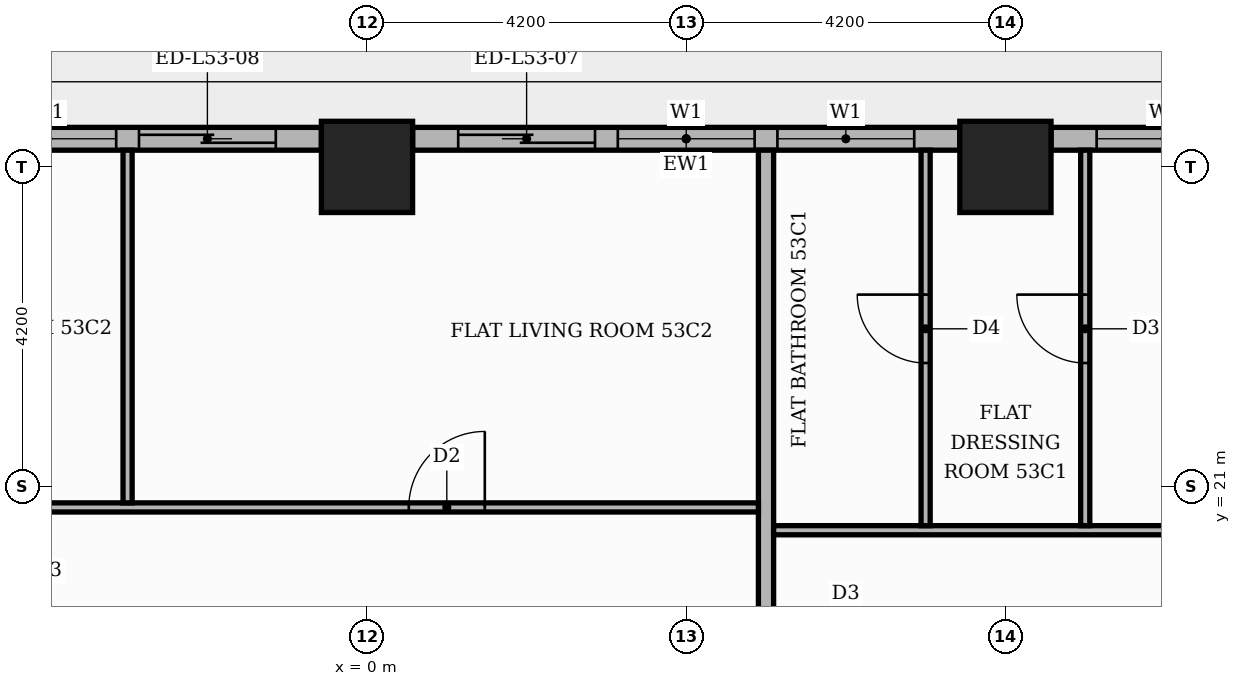
"""IFC4 building model, lengths in metres.
Left out: names, types, materials, properties, quantities, classifications, styles, units other than length and angle.
Written with IfcOpenShell. Run it as: python <this file> out.ifc"""

import sys

from ifc_helpers import new_model, si_unit, direction, frame, frame_2d, origin, origin_2d, place, context, subcontext, project, spatial, rectangle, extrude, element, fill, save


model = new_model("IFC4")
c1 = context("Model", 3, precision=1e-05, world=origin(), true_north=direction((0.0, 1.0)))
c2 = subcontext(c1, "Body", "Model", "MODEL_VIEW")
j1 = project(units=[si_unit("LENGTHUNIT", "METRE"), si_unit("PLANEANGLEUNIT", "RADIAN")], contexts=[c1])
p1 = place(None, origin())
s1 = spatial("IfcSite", under=j1, at=p1, CompositionType="ELEMENT")
p2 = place(p1, origin())
s2 = spatial("IfcBuilding", under=s1, at=p2, CompositionType="ELEMENT")
p3 = place(p2, frame((0.0, 0.0, 223.5)))
s3 = spatial("IfcBuildingStorey", under=s2, at=p3, CompositionType="ELEMENT", Elevation=223.5)
for number, where, z_axis, x_axis in (
    (1, (0.0, 25.2, 0.0), (0.0, 0.0, 1.0), (1.0, 0.0, 0.0)),
    (2, (8.4, 25.2, 0.0), (0.0, 0.0, 1.0), (1.0, 0.0, 0.0)),
):
    element("IfcColumn", number, at=place(p3, frame(where, z_axis=z_axis, x_axis=x_axis)), inside=s3, PredefinedType="COLUMN", context=c2, shape_type="SweptSolid", body=[
        extrude(rectangle(XDim=1.2, YDim=1.2, at=origin_2d()), origin(), (0.0, 0.0, 1.0), 3.9),
    ])
p4 = place(p3, frame((16.2, 25.57, 0.0), z_axis=(0.0, 0.0, 1.0), x_axis=(-1.0, 0.0, 0.0)))
e3 = element("IfcWall", 3, at=p4, inside=s3, PredefinedType="STANDARD", context=c2, shape_type="SweptSolid", body=[
    extrude(rectangle(XDim=7.2, YDim=0.3, at=frame_2d((3.6, 0.0))), origin(), (0.0, 0.0, 1.0), 3.48),
])
p5 = place(p4, frame((0.6, 0.0, 0.0)))
e4 = element("IfcOpeningElement", 4, at=p5, cuts=e3, PredefinedType="OPENING", context=c2, shape_type="SweptSolid", body=[
    extrude(rectangle(XDim=1.8, YDim=2.4, at=frame_2d((0.9, 1.2))), frame((0.0, 0.16, 0.0), z_axis=(0.0, -1.0, 0.0), x_axis=(1.0, 0.0, 0.0)), (0.0, 0.0, 1.0), 0.32),
])
p6 = place(p4, frame((2.7, 0.0, 0.0)))
e5 = element("IfcOpeningElement", 5, at=p6, cuts=e3, PredefinedType="OPENING", context=c2, shape_type="SweptSolid", body=[
    extrude(rectangle(XDim=1.8, YDim=2.4, at=frame_2d((0.9, 1.2))), frame((0.0, 0.16, 0.0), z_axis=(0.0, -1.0, 0.0), x_axis=(1.0, 0.0, 0.0)), (0.0, 0.0, 1.0), 0.32),
])
p7 = place(p4, frame((4.8, 0.0, 0.9)))
e6 = element("IfcOpeningElement", 6, at=p7, cuts=e3, PredefinedType="OPENING", context=c2, shape_type="SweptSolid", body=[
    extrude(rectangle(XDim=1.8, YDim=2.1, at=frame_2d((0.9, 1.05))), frame((0.0, 0.16, 0.0), z_axis=(0.0, -1.0, 0.0), x_axis=(1.0, 0.0, 0.0)), (0.0, 0.0, 1.0), 0.32),
])
p8 = place(p3, frame((7.8, 25.57, 0.0), z_axis=(0.0, 0.0, 1.0), x_axis=(-1.0, 0.0, 0.0)))
e7 = element("IfcWall", 7, at=p8, inside=s3, PredefinedType="STANDARD", context=c2, shape_type="SweptSolid", body=[
    extrude(rectangle(XDim=7.2, YDim=0.3, at=frame_2d((3.6, 0.0))), origin(), (0.0, 0.0, 1.0), 3.48),
])
p9 = place(p8, frame((0.6, 0.0, 0.9)))
e8 = element("IfcOpeningElement", 8, at=p9, cuts=e7, PredefinedType="OPENING", context=c2, shape_type="SweptSolid", body=[
    extrude(rectangle(XDim=1.8, YDim=2.1, at=frame_2d((0.9, 1.05))), frame((0.0, 0.16, 0.0), z_axis=(0.0, -1.0, 0.0), x_axis=(1.0, 0.0, 0.0)), (0.0, 0.0, 1.0), 0.32),
])
p10 = place(p8, frame((2.7, 0.0, 0.9)))
e9 = element("IfcOpeningElement", 9, at=p10, cuts=e7, PredefinedType="OPENING", context=c2, shape_type="SweptSolid", body=[
    extrude(rectangle(XDim=1.8, YDim=2.1, at=frame_2d((0.9, 1.05))), frame((0.0, 0.16, 0.0), z_axis=(0.0, -1.0, 0.0), x_axis=(1.0, 0.0, 0.0)), (0.0, 0.0, 1.0), 0.32),
])
p11 = place(p8, frame((4.8, 0.0, 0.0)))
e10 = element("IfcOpeningElement", 10, at=p11, cuts=e7, PredefinedType="OPENING", context=c2, shape_type="SweptSolid", body=[
    extrude(rectangle(XDim=1.8, YDim=2.4, at=frame_2d((0.9, 1.2))), frame((0.0, 0.16, 0.0), z_axis=(0.0, -1.0, 0.0), x_axis=(1.0, 0.0, 0.0)), (0.0, 0.0, 1.0), 0.32),
])
p12 = place(p3, frame((-0.6, 25.57, 0.0), z_axis=(0.0, 0.0, 1.0), x_axis=(-1.0, 0.0, 0.0)))
e11 = element("IfcWall", 11, at=p12, inside=s3, PredefinedType="STANDARD", context=c2, shape_type="SweptSolid", body=[
    extrude(rectangle(XDim=7.2, YDim=0.3, at=frame_2d((3.6, 0.0))), origin(), (0.0, 0.0, 1.0), 3.48),
])
p13 = place(p12, frame((0.6, 0.0, 0.0)))
e12 = element("IfcOpeningElement", 12, at=p13, cuts=e11, PredefinedType="OPENING", context=c2, shape_type="SweptSolid", body=[
    extrude(rectangle(XDim=1.8, YDim=2.4, at=frame_2d((0.9, 1.2))), frame((0.0, 0.16, 0.0), z_axis=(0.0, -1.0, 0.0), x_axis=(1.0, 0.0, 0.0)), (0.0, 0.0, 1.0), 0.32),
])
p14 = place(p12, frame((2.7, 0.0, 0.9)))
e13 = element("IfcOpeningElement", 13, at=p14, cuts=e11, PredefinedType="OPENING", context=c2, shape_type="SweptSolid", body=[
    extrude(rectangle(XDim=1.8, YDim=2.1, at=frame_2d((0.9, 1.05))), frame((0.0, 0.16, 0.0), z_axis=(0.0, -1.0, 0.0), x_axis=(1.0, 0.0, 0.0)), (0.0, 0.0, 1.0), 0.32),
])
p15 = place(p12, frame((4.8, 0.0, 0.0)))
e14 = element("IfcOpeningElement", 14, at=p15, cuts=e11, PredefinedType="OPENING", context=c2, shape_type="SweptSolid", body=[
    extrude(rectangle(XDim=1.8, YDim=2.4, at=frame_2d((0.9, 1.2))), frame((0.0, 0.16, 0.0), z_axis=(0.0, -1.0, 0.0), x_axis=(1.0, 0.0, 0.0)), (0.0, 0.0, 1.0), 0.32),
])
p16 = place(p3, frame((5.25, 13.75, 0.0), z_axis=(0.0, 0.0, 1.0), x_axis=(0.0, 1.0, 0.0)))
e15 = element("IfcWall", 15, at=p16, inside=s3, PredefinedType="PARTITIONING", context=c2, shape_type="SweptSolid", body=[
    extrude(rectangle(XDim=11.67, YDim=0.2, at=frame_2d((5.835, 0.0))), origin(), (0.0, 0.0, 1.0), 3.48),
])
p17 = place(p3, frame((5.35, 20.42, 0.0), z_axis=(0.0, 0.0, 1.0), x_axis=(1.0, 0.0, 0.0)))
e16 = element("IfcWall", 16, at=p17, inside=s3, PredefinedType="PARTITIONING", context=c2, shape_type="SweptSolid", body=[
    extrude(rectangle(XDim=15.869, YDim=0.12, at=frame_2d((7.935, 0.0))), origin(), (0.0, 0.0, 1.0), 3.48),
])
p18 = place(p17, frame((8.85, 0.0, 0.0)))
e17 = element("IfcOpeningElement", 17, at=p18, cuts=e16, PredefinedType="OPENING", context=c2, shape_type="SweptSolid", body=[
    extrude(rectangle(XDim=1.0, YDim=2.1, at=frame_2d((0.5, 1.05))), frame((0.0, 0.07, 0.0), z_axis=(0.0, -1.0, 0.0), x_axis=(1.0, 0.0, 0.0)), (0.0, 0.0, 1.0), 0.14),
])
p19 = place(p17, frame((5.75, 0.0, 0.0)))
e18 = element("IfcOpeningElement", 18, at=p19, cuts=e16, PredefinedType="OPENING", context=c2, shape_type="SweptSolid", body=[
    extrude(rectangle(XDim=0.9, YDim=2.1, at=frame_2d((0.45, 1.05))), frame((0.0, 0.07, 0.0), z_axis=(0.0, -1.0, 0.0), x_axis=(1.0, 0.0, 0.0)), (0.0, 0.0, 1.0), 0.14),
])
p20 = place(p3, frame((7.35, 20.48, 0.0), z_axis=(0.0, 0.0, 1.0), x_axis=(0.0, 1.0, 0.0)))
e19 = element("IfcWall", 19, at=p20, inside=s3, PredefinedType="PARTITIONING", context=c2, shape_type="SweptSolid", body=[
    extrude(rectangle(XDim=4.94, YDim=0.12, at=frame_2d((2.47, 0.0))), origin(), (0.0, 0.0, 1.0), 3.48),
])
p21 = place(p20, frame((2.14, 0.0, 0.0)))
e20 = element("IfcOpeningElement", 20, at=p21, cuts=e19, PredefinedType="OPENING", context=c2, shape_type="SweptSolid", body=[
    extrude(rectangle(XDim=0.9, YDim=2.1, at=frame_2d((0.45, 1.05))), frame((0.0, 0.07, 0.0), z_axis=(0.0, -1.0, 0.0), x_axis=(1.0, 0.0, 0.0)), (0.0, 0.0, 1.0), 0.14),
])
p22 = place(p3, frame((9.45, 20.48, 0.0), z_axis=(0.0, 0.0, 1.0), x_axis=(0.0, 1.0, 0.0)))
e21 = element("IfcWall", 21, at=p22, inside=s3, PredefinedType="PARTITIONING", context=c2, shape_type="SweptSolid", body=[
    extrude(rectangle(XDim=4.94, YDim=0.12, at=frame_2d((2.47, 0.0))), origin(), (0.0, 0.0, 1.0), 3.48),
])
p23 = place(p22, frame((2.14, 0.0, 0.0)))
e22 = element("IfcOpeningElement", 22, at=p23, cuts=e21, PredefinedType="OPENING", context=c2, shape_type="SweptSolid", body=[
    extrude(rectangle(XDim=0.9, YDim=2.1, at=frame_2d((0.45, 1.05))), frame((0.0, 0.07, 0.0), z_axis=(0.0, -1.0, 0.0), x_axis=(1.0, 0.0, 0.0)), (0.0, 0.0, 1.0), 0.14),
])
p24 = place(p3, frame((-13.55, 20.72, 0.0), z_axis=(0.0, 0.0, 1.0), x_axis=(1.0, 0.0, 0.0)))
e23 = element("IfcWall", 23, at=p24, inside=s3, PredefinedType="PARTITIONING", context=c2, shape_type="SweptSolid", body=[
    extrude(rectangle(XDim=18.7, YDim=0.12, at=frame_2d((9.35, 0.0))), origin(), (0.0, 0.0, 1.0), 3.48),
])
p25 = place(p24, frame((14.1, 0.0, 0.0)))
e24 = element("IfcOpeningElement", 24, at=p25, cuts=e23, PredefinedType="OPENING", context=c2, shape_type="SweptSolid", body=[
    extrude(rectangle(XDim=1.0, YDim=2.1, at=frame_2d((0.5, 1.05))), frame((0.0, 0.07, 0.0), z_axis=(0.0, -1.0, 0.0), x_axis=(1.0, 0.0, 0.0)), (0.0, 0.0, 1.0), 0.14),
])
p26 = place(p24, frame((6.8, 0.0, 0.0)))
e25 = element("IfcOpeningElement", 25, at=p26, cuts=e23, PredefinedType="OPENING", context=c2, shape_type="SweptSolid", body=[
    extrude(rectangle(XDim=0.9, YDim=2.1, at=frame_2d((0.45, 1.05))), frame((0.0, 0.07, 0.0), z_axis=(0.0, -1.0, 0.0), x_axis=(1.0, 0.0, 0.0)), (0.0, 0.0, 1.0), 0.14),
])
p27 = place(p3, frame((-3.15, 20.78, 0.0), z_axis=(0.0, 0.0, 1.0), x_axis=(0.0, 1.0, 0.0)))
e26 = element("IfcWall", 26, at=p27, inside=s3, PredefinedType="PARTITIONING", context=c2, shape_type="SweptSolid", body=[
    extrude(rectangle(XDim=4.64, YDim=0.12, at=frame_2d((2.32, 0.0))), origin(), (0.0, 0.0, 1.0), 3.48),
])
p28 = place(p7, origin())
e27 = element("IfcWindow", 27, at=p28, inside=s3, PartitioningType="SINGLE_PANEL", PredefinedType="WINDOW", context=c2, shape_type="SweptSolid", body=[
    extrude(rectangle(XDim=1.8, YDim=2.1, at=frame_2d((0.9, 1.05))), frame((0.0, 0.03, 0.0), z_axis=(0.0, -1.0, 0.0), x_axis=(1.0, 0.0, 0.0)), (0.0, 0.0, 1.0), 0.06),
])
fill(e6, e27)
p29 = place(p9, origin())
e28 = element("IfcWindow", 28, at=p29, inside=s3, PartitioningType="SINGLE_PANEL", PredefinedType="WINDOW", context=c2, shape_type="SweptSolid", body=[
    extrude(rectangle(XDim=1.8, YDim=2.1, at=frame_2d((0.9, 1.05))), frame((0.0, 0.03, 0.0), z_axis=(0.0, -1.0, 0.0), x_axis=(1.0, 0.0, 0.0)), (0.0, 0.0, 1.0), 0.06),
])
fill(e8, e28)
p30 = place(p10, origin())
e29 = element("IfcWindow", 29, at=p30, inside=s3, PartitioningType="SINGLE_PANEL", PredefinedType="WINDOW", context=c2, shape_type="SweptSolid", body=[
    extrude(rectangle(XDim=1.8, YDim=2.1, at=frame_2d((0.9, 1.05))), frame((0.0, 0.03, 0.0), z_axis=(0.0, -1.0, 0.0), x_axis=(1.0, 0.0, 0.0)), (0.0, 0.0, 1.0), 0.06),
])
fill(e9, e29)
p31 = place(p11, origin())
e30 = element("IfcDoor", 30, at=p31, inside=s3, OperationType="SLIDING_TO_RIGHT", PredefinedType="DOOR", context=c2, shape_type="SweptSolid", body=[
    extrude(rectangle(XDim=1.8, YDim=2.4, at=frame_2d((0.9, 1.2))), frame((0.0, 0.025, 0.0), z_axis=(0.0, -1.0, 0.0), x_axis=(1.0, 0.0, 0.0)), (0.0, 0.0, 1.0), 0.05),
])
fill(e10, e30)
p32 = place(p13, origin())
e31 = element("IfcDoor", 31, at=p32, inside=s3, OperationType="SLIDING_TO_LEFT", PredefinedType="DOOR", context=c2, shape_type="SweptSolid", body=[
    extrude(rectangle(XDim=1.8, YDim=2.4, at=frame_2d((0.9, 1.2))), frame((0.0, 0.025, 0.0), z_axis=(0.0, -1.0, 0.0), x_axis=(1.0, 0.0, 0.0)), (0.0, 0.0, 1.0), 0.05),
])
fill(e12, e31)
p33 = place(p14, origin())
e32 = element("IfcWindow", 32, at=p33, inside=s3, PartitioningType="SINGLE_PANEL", PredefinedType="WINDOW", context=c2, shape_type="SweptSolid", body=[
    extrude(rectangle(XDim=1.8, YDim=2.1, at=frame_2d((0.9, 1.05))), frame((0.0, 0.03, 0.0), z_axis=(0.0, -1.0, 0.0), x_axis=(1.0, 0.0, 0.0)), (0.0, 0.0, 1.0), 0.06),
])
fill(e13, e32)
p34 = place(p23, origin())
e33 = element("IfcDoor", 33, at=p34, inside=s3, OperationType="SINGLE_SWING_RIGHT", PredefinedType="DOOR", context=c2, shape_type="SweptSolid", body=[
    extrude(rectangle(XDim=0.9, YDim=2.1, at=frame_2d((0.45, 1.05))), frame((0.0, 0.025, 0.0), z_axis=(0.0, -1.0, 0.0), x_axis=(1.0, 0.0, 0.0)), (0.0, 0.0, 1.0), 0.05),
])
fill(e22, e33)
p35 = place(p21, origin())
e34 = element("IfcDoor", 34, at=p35, inside=s3, OperationType="SINGLE_SWING_RIGHT", PredefinedType="DOOR", context=c2, shape_type="SweptSolid", body=[
    extrude(rectangle(XDim=0.9, YDim=2.1, at=frame_2d((0.45, 1.05))), frame((0.0, 0.025, 0.0), z_axis=(0.0, -1.0, 0.0), x_axis=(1.0, 0.0, 0.0)), (0.0, 0.0, 1.0), 0.05),
])
fill(e20, e34)
p36 = place(p25, origin())
e35 = element("IfcDoor", 35, at=p36, inside=s3, OperationType="SINGLE_SWING_RIGHT", PredefinedType="DOOR", context=c2, shape_type="SweptSolid", body=[
    extrude(rectangle(XDim=1.0, YDim=2.1, at=frame_2d((0.5, 1.05))), frame((0.0, 0.025, 0.0), z_axis=(0.0, -1.0, 0.0), x_axis=(1.0, 0.0, 0.0)), (0.0, 0.0, 1.0), 0.05),
])
fill(e24, e35)
save(model, sys.argv[1])
